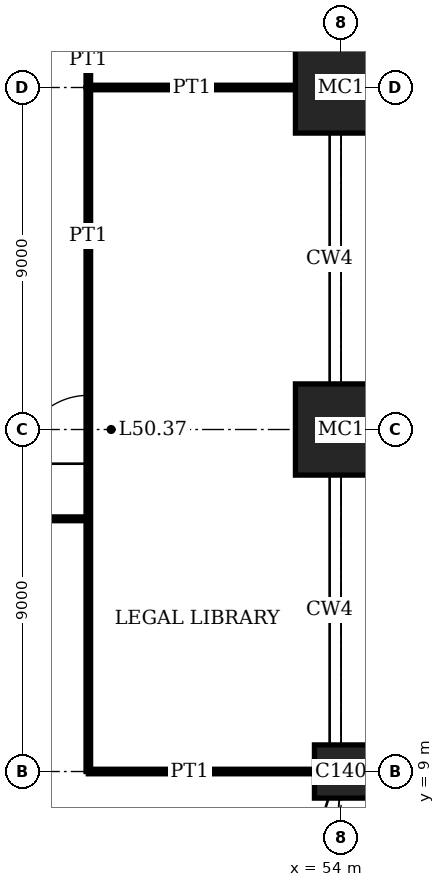
"""IFC4 building model, lengths in metres.
Left out: names, types, materials, properties, quantities, classifications, styles, units other than length and angle.
Written with IfcOpenShell. Run it as: python <this file> out.ifc"""

import sys

from ifc_helpers import new_model, si_unit, direction, frame, frame_2d, origin, origin_2d, place, context, subcontext, project, spatial, rectangle, extrude, element, fill, save


model = new_model("IFC4")
c1 = context("Model", 3, precision=1e-05, world=origin(), true_north=direction((0.0, 1.0)))
c2 = subcontext(c1, "Body", "Model", "MODEL_VIEW")
j1 = project(units=[si_unit("LENGTHUNIT", "METRE"), si_unit("PLANEANGLEUNIT", "RADIAN")], contexts=[c1])
p1 = place(None, origin())
s1 = spatial("IfcSite", under=j1, at=p1, CompositionType="ELEMENT")
p2 = place(p1, origin())
s2 = spatial("IfcBuilding", under=s1, at=p2, CompositionType="ELEMENT")
p3 = place(p2, frame((0.0, 0.0, 206.2)))
s3 = spatial("IfcBuildingStorey", under=s2, at=p3, CompositionType="ELEMENT", Elevation=206.2)
p4 = place(p3, frame((54.0, 9.0, 0.0), z_axis=(0.0, 0.0, 1.0), x_axis=(1.0, 0.0, 0.0)))
e1 = element("IfcColumn", 1, at=p4, inside=s3, PredefinedType="COLUMN", context=c2, shape_type="SweptSolid", body=[
    extrude(rectangle(XDim=1.4, YDim=1.4, at=origin_2d()), origin(), (0.0, 0.0, 1.0), 4.0),
])
for number, where, z_axis, x_axis in (
    (2, (54.0, 18.0, 0.0), (0.0, 0.0, 1.0), (1.0, 0.0, 0.0)),
    (3, (54.0, 27.0, 0.0), (0.0, 0.0, 1.0), (1.0, 0.0, 0.0)),
):
    element("IfcColumn", number, at=place(p3, frame(where, z_axis=z_axis, x_axis=x_axis)), inside=s3, PredefinedType="COLUMN", context=c2, shape_type="SweptSolid", body=[
        extrude(rectangle(XDim=2.4, YDim=2.4, at=origin_2d()), origin(), (0.0, 0.0, 1.0), 4.0),
    ])
p5 = place(p3, frame((47.35, 9.0, 0.0), z_axis=(0.0, 0.0, 1.0), x_axis=(1.0, 0.0, 0.0)))
e4 = element("IfcWall", 4, at=p5, inside=s3, PredefinedType="PARTITIONING", context=c2, shape_type="SweptSolid", body=[
    extrude(rectangle(XDim=5.95, YDim=0.12, at=frame_2d((2.975, 0.0))), origin(), (0.0, 0.0, 1.0), 3.05),
])
p6 = place(p3, frame((22.5, 15.65, 0.0), z_axis=(0.0, 0.0, 1.0), x_axis=(1.0, 0.0, 0.0)))
e5 = element("IfcWall", 5, at=p6, inside=s3, PredefinedType="PARTITIONING", context=c2, shape_type="SweptSolid", body=[
    extrude(rectangle(XDim=24.85, YDim=0.1, at=frame_2d((12.425, 0.0))), origin(), (0.0, 0.0, 1.0), 3.75),
])
p7 = place(p6, frame((11.925, 0.0, 0.0)))
e6 = element("IfcOpeningElement", 6, at=p7, cuts=e5, PredefinedType="OPENING", context=c2, shape_type="SweptSolid", body=[
    extrude(rectangle(XDim=1.0, YDim=2.4, at=frame_2d((0.5, 1.2))), frame((0.0, 0.06, 0.0), z_axis=(0.0, -1.0, 0.0), x_axis=(1.0, 0.0, 0.0)), (0.0, 0.0, 1.0), 0.12),
])
p8 = place(p3, frame((47.35, 27.0, 0.0), z_axis=(0.0, 0.0, 1.0), x_axis=(1.0, 0.0, 0.0)))
e7 = element("IfcWall", 7, at=p8, inside=s3, PredefinedType="PARTITIONING", context=c2, shape_type="SweptSolid", body=[
    extrude(rectangle(XDim=5.45, YDim=0.12, at=frame_2d((2.725, 0.0))), origin(), (0.0, 0.0, 1.0), 3.05),
])
p9 = place(p3, frame((47.35, 9.0, 0.0), z_axis=(0.0, 0.0, 1.0), x_axis=(0.0, 1.0, 0.0)))
e8 = element("IfcWall", 8, at=p9, inside=s3, PredefinedType="PARTITIONING", context=c2, shape_type="SweptSolid", body=[
    extrude(rectangle(XDim=18.0, YDim=0.12, at=frame_2d((9.0, 0.0))), origin(), (0.0, 0.0, 1.0), 3.75),
])
p10 = place(p9, frame((8.1, 0.0, 0.0)))
e9 = element("IfcOpeningElement", 9, at=p10, cuts=e8, PredefinedType="OPENING", context=c2, shape_type="SweptSolid", body=[
    extrude(rectangle(XDim=1.8, YDim=2.4, at=frame_2d((0.9, 1.2))), frame((0.0, 0.07, 0.0), z_axis=(0.0, -1.0, 0.0), x_axis=(1.0, 0.0, 0.0)), (0.0, 0.0, 1.0), 0.14),
])
p11 = place(p3, frame((47.35, 27.0, 0.0), z_axis=(0.0, 0.0, 1.0), x_axis=(0.0, 1.0, 0.0)))
e10 = element("IfcWall", 10, at=p11, inside=s3, PredefinedType="PARTITIONING", context=c2, shape_type="SweptSolid", body=[
    extrude(rectangle(XDim=4.5, YDim=0.12, at=frame_2d((2.25, 0.0))), origin(), (0.0, 0.0, 1.0), 3.75),
])
p12 = place(p11, frame((1.75, 0.0, 0.0)))
e11 = element("IfcOpeningElement", 11, at=p12, cuts=e10, PredefinedType="OPENING", context=c2, shape_type="SweptSolid", body=[
    extrude(rectangle(XDim=1.0, YDim=2.4, at=frame_2d((0.5, 1.2))), frame((0.0, 0.07, 0.0), z_axis=(0.0, -1.0, 0.0), x_axis=(1.0, 0.0, 0.0)), (0.0, 0.0, 1.0), 0.14),
])
p13 = place(p10, origin())
e12 = element("IfcDoor", 12, at=p13, inside=s3, OperationType="DOUBLE_DOOR_SINGLE_SWING", PredefinedType="DOOR", context=c2, shape_type="SweptSolid", body=[
    extrude(rectangle(XDim=1.8, YDim=2.4, at=frame_2d((0.9, 1.2))), frame((0.0, 0.025, 0.0), z_axis=(0.0, -1.0, 0.0), x_axis=(1.0, 0.0, 0.0)), (0.0, 0.0, 1.0), 0.05),
])
fill(e9, e12)
save(model, sys.argv[1])
